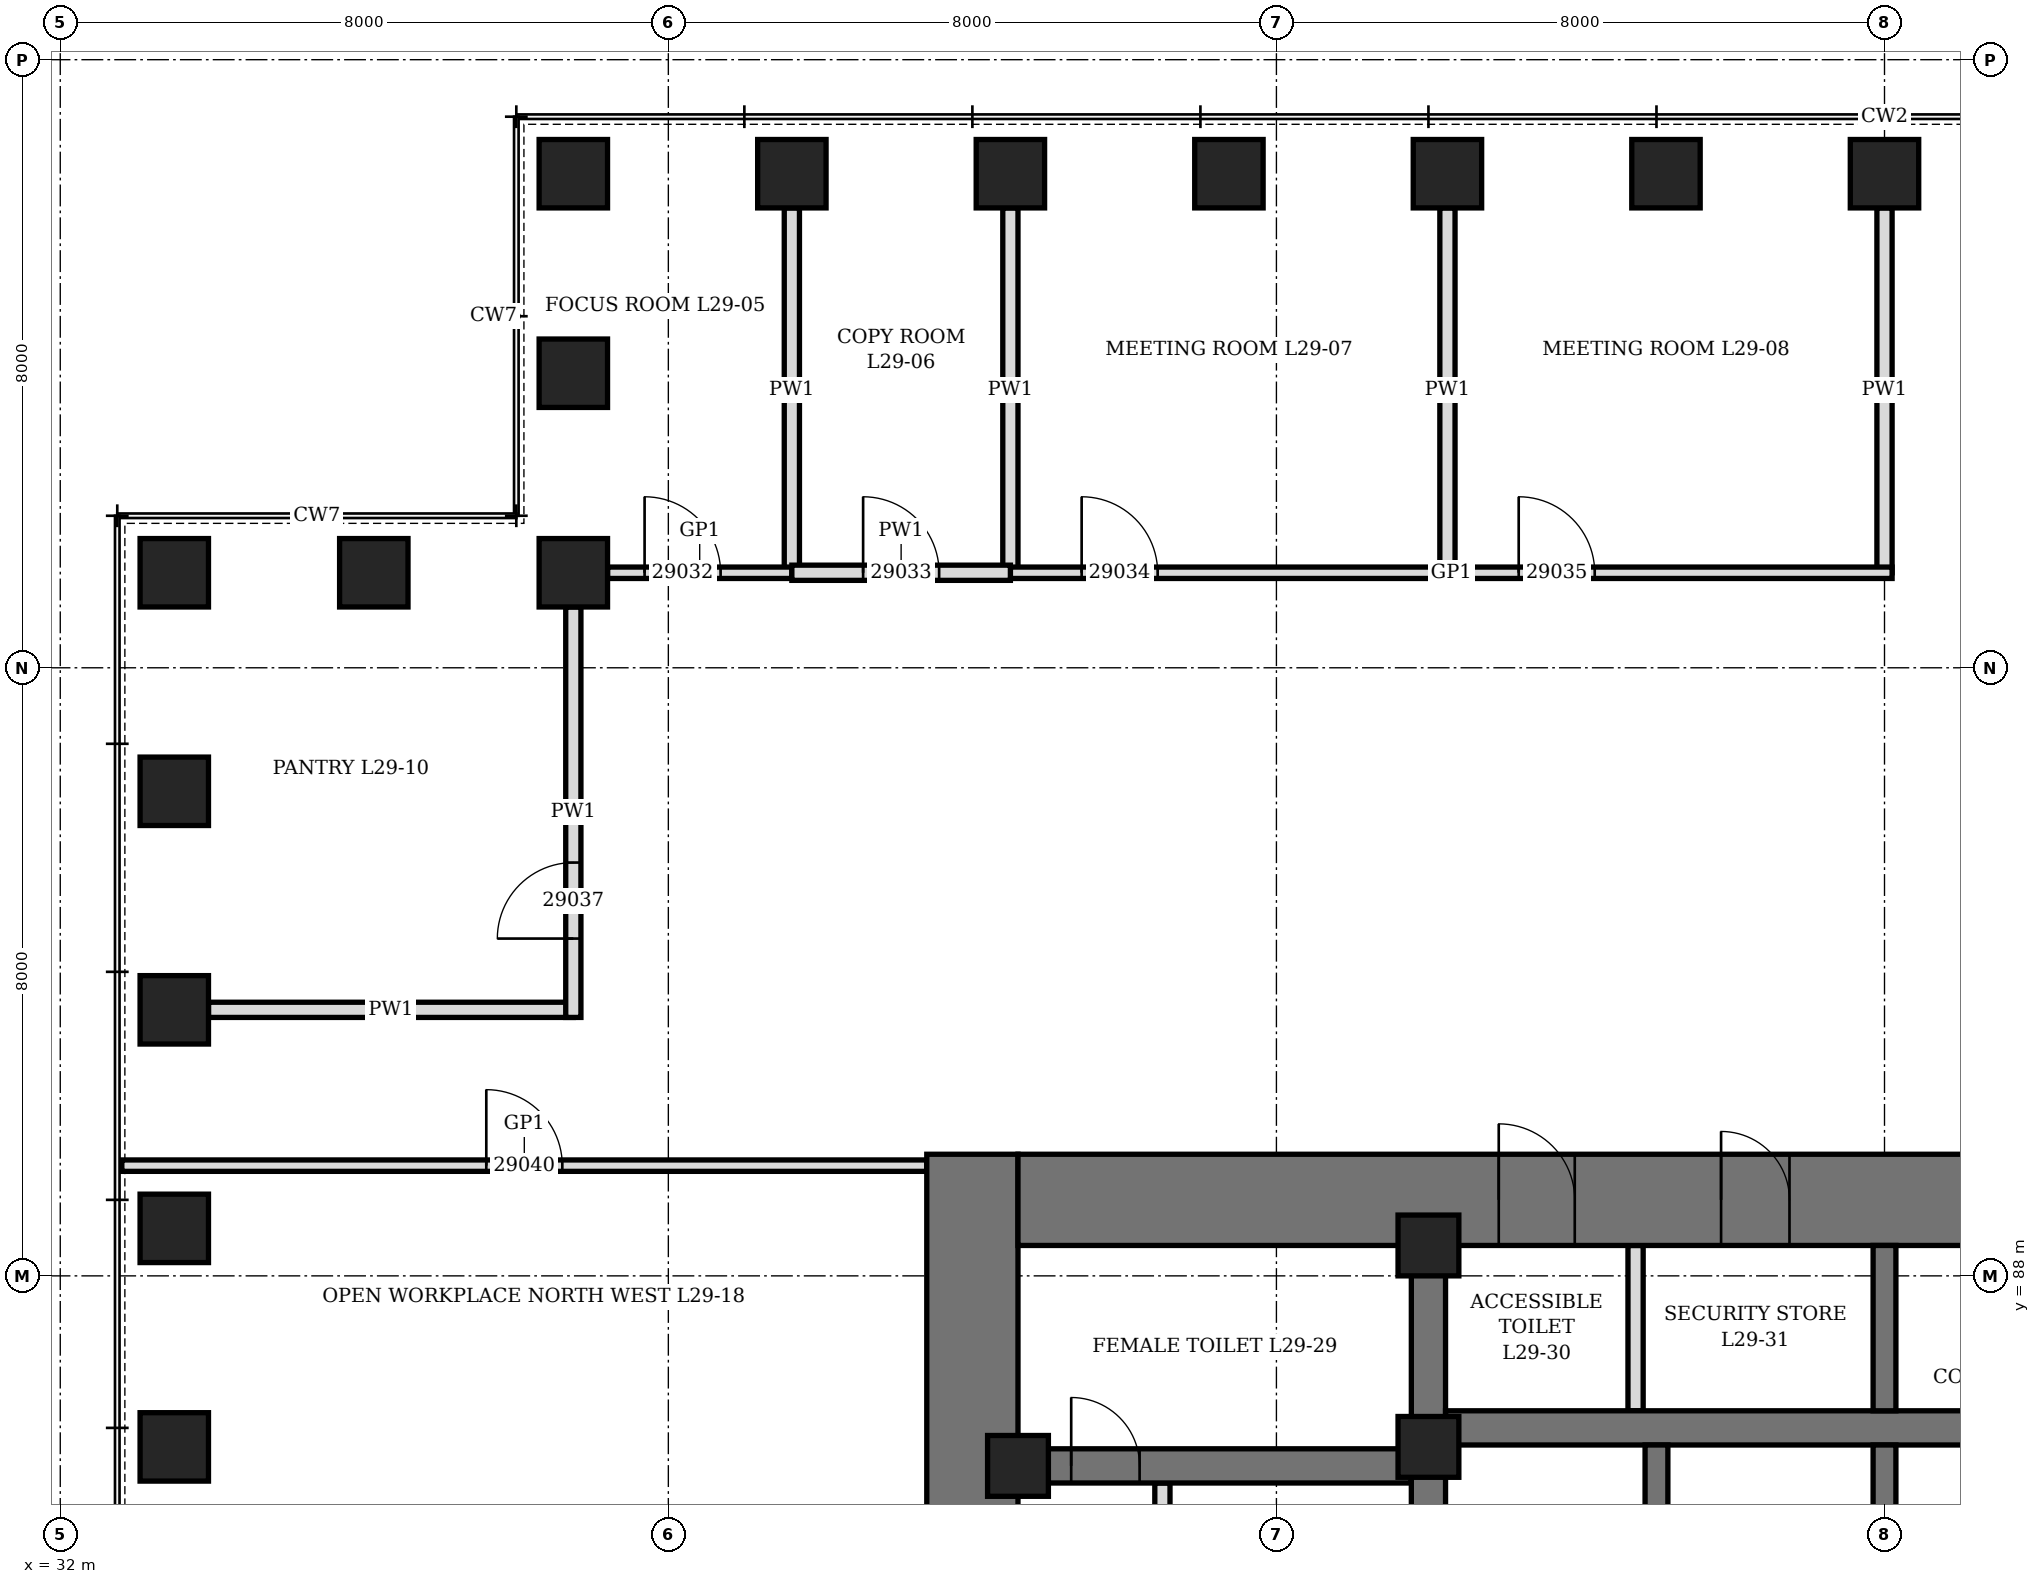
"""IFC4 building model, lengths in metres.
Left out: names, types, materials, properties, quantities, classifications, styles, units other than length and angle.
Written with IfcOpenShell. Run it as: python <this file> out.ifc"""

import sys

from ifc_helpers import new_model, si_unit, direction, frame, frame_2d, origin, origin_2d, place, context, subcontext, project, spatial, rectangle, hollow_rectangle, extrude, element, fill, save


model = new_model("IFC4")
c1 = context("Model", 3, precision=1e-05, world=origin(), true_north=direction((0.0, 1.0)))
c2 = subcontext(c1, "Body", "Model", "MODEL_VIEW")
j1 = project(units=[si_unit("LENGTHUNIT", "METRE"), si_unit("PLANEANGLEUNIT", "RADIAN")], contexts=[c1])
p1 = place(None, origin())
s1 = spatial("IfcSite", under=j1, at=p1, CompositionType="ELEMENT")
p2 = place(p1, origin())
s2 = spatial("IfcBuilding", under=s1, at=p2, CompositionType="ELEMENT")
p3 = place(p2, frame((0.0, 0.0, 133.3)))
s3 = spatial("IfcBuildingStorey", under=s2, at=p3, CompositionType="ELEMENT", Elevation=133.3)
for number, where, z_axis, x_axis in (
    (1, (56.0, 102.5, 0.0), (0.0, 0.0, 1.0), (1.0, 0.0, 0.0)),
    (2, (53.125, 102.5, 0.0), (0.0, 0.0, 1.0), (1.0, 0.0, 0.0)),
    (3, (50.25, 102.5, 0.0), (0.0, 0.0, 1.0), (1.0, 0.0, 0.0)),
    (4, (47.375, 102.5, 0.0), (0.0, 0.0, 1.0), (1.0, 0.0, 0.0)),
    (5, (44.5, 102.5, 0.0), (0.0, 0.0, 1.0), (1.0, 0.0, 0.0)),
    (6, (41.625, 102.5, 0.0), (0.0, 0.0, 1.0), (1.0, 0.0, 0.0)),
    (7, (38.75, 102.5, 0.0), (0.0, 0.0, 1.0), (0.0, 1.0, 0.0)),
    (8, (38.75, 99.875, 0.0), (0.0, 0.0, 1.0), (0.0, 1.0, 0.0)),
    (9, (38.75, 97.25, 0.0), (0.0, 0.0, 1.0), (1.0, 0.0, 0.0)),
    (10, (36.125, 97.25, 0.0), (0.0, 0.0, 1.0), (1.0, 0.0, 0.0)),
    (11, (33.5, 97.25, 0.0), (0.0, 0.0, 1.0), (0.0, 1.0, 0.0)),
    (12, (33.5, 94.375, 0.0), (0.0, 0.0, 1.0), (0.0, 1.0, 0.0)),
    (13, (33.5, 91.5, 0.0), (0.0, 0.0, 1.0), (0.0, 1.0, 0.0)),
    (14, (33.5, 88.625, 0.0), (0.0, 0.0, 1.0), (0.0, 1.0, 0.0)),
    (15, (33.5, 85.75, 0.0), (0.0, 0.0, 1.0), (0.0, 1.0, 0.0)),
):
    element("IfcColumn", number, at=place(p3, frame(where, z_axis=z_axis, x_axis=x_axis)), inside=s3, PredefinedType="COLUMN", context=c2, shape_type="SweptSolid", body=[
        extrude(hollow_rectangle(XDim=0.9, YDim=0.9, WallThickness=0.15, at=origin_2d()), origin(), (0.0, 0.0, 1.0), 4.2),
    ])
p4 = place(p3, frame((44.0, 70.4, 0.0), z_axis=(0.0, 0.0, 1.0), x_axis=(0.0, 1.0, 0.0)))
e16 = element("IfcWall", 16, at=p4, inside=s3, PredefinedType="SHEAR", context=c2, shape_type="SweptSolid", body=[
    extrude(rectangle(XDim=19.2, YDim=1.2, at=frame_2d((9.6, 0.0))), origin(), (0.0, 0.0, 1.0), 4.2),
])
p5 = place(p4, frame((8.6, 0.0, 0.0)))
e17 = element("IfcOpeningElement", 17, at=p5, cuts=e16, PredefinedType="OPENING", context=c2, shape_type="SweptSolid", body=[
    extrude(rectangle(XDim=2.0, YDim=2.4, at=frame_2d((1.0, 1.2))), frame((0.0, 0.61, 0.0), z_axis=(0.0, -1.0, 0.0), x_axis=(1.0, 0.0, 0.0)), (0.0, 0.0, 1.0), 1.22),
])
p6 = place(p3, frame((44.6, 89.0, 0.0), z_axis=(0.0, 0.0, 1.0), x_axis=(1.0, 0.0, 0.0)))
e18 = element("IfcWall", 18, at=p6, inside=s3, PredefinedType="SHEAR", context=c2, shape_type="SweptSolid", body=[
    extrude(rectangle(XDim=22.8, YDim=1.2, at=frame_2d((11.4, 0.0))), origin(), (0.0, 0.0, 1.0), 4.2),
])
p7 = place(p6, frame((6.325, 0.0, 0.0)))
e19 = element("IfcOpeningElement", 19, at=p7, cuts=e18, PredefinedType="OPENING", context=c2, shape_type="SweptSolid", body=[
    extrude(rectangle(XDim=1.0, YDim=2.1, at=frame_2d((0.5, 1.05))), frame((0.0, 0.61, 0.0), z_axis=(0.0, -1.0, 0.0), x_axis=(1.0, 0.0, 0.0)), (0.0, 0.0, 1.0), 1.22),
])
p8 = place(p6, frame((9.25, 0.0, 0.0)))
e20 = element("IfcOpeningElement", 20, at=p8, cuts=e18, PredefinedType="OPENING", context=c2, shape_type="SweptSolid", body=[
    extrude(rectangle(XDim=0.9, YDim=2.1, at=frame_2d((0.45, 1.05))), frame((0.0, 0.61, 0.0), z_axis=(0.0, -1.0, 0.0), x_axis=(1.0, 0.0, 0.0)), (0.0, 0.0, 1.0), 1.22),
])
p9 = place(p6, frame((13.012, 0.0, 0.0)))
e21 = element("IfcOpeningElement", 21, at=p9, cuts=e18, PredefinedType="OPENING", context=c2, shape_type="SweptSolid", body=[
    extrude(rectangle(XDim=0.9, YDim=2.1, at=frame_2d((0.45, 1.05))), frame((0.0, 0.61, 0.0), z_axis=(0.0, -1.0, 0.0), x_axis=(1.0, 0.0, 0.0)), (0.0, 0.0, 1.0), 1.22),
])
p10 = place(p3, frame((50.0, 71.6, 0.0), z_axis=(0.0, 0.0, 1.0), x_axis=(0.0, 1.0, 0.0)))
e22 = element("IfcWall", 22, at=p10, inside=s3, PredefinedType="SHEAR", context=c2, shape_type="SweptSolid", body=[
    extrude(rectangle(XDim=16.8, YDim=0.45, at=frame_2d((8.4, 0.0))), origin(), (0.0, 0.0, 1.0), 4.2),
])
p11 = place(p10, frame((7.5, 0.0, 0.0)))
e23 = element("IfcOpeningElement", 23, at=p11, cuts=e22, PredefinedType="OPENING", context=c2, shape_type="SweptSolid", body=[
    extrude(rectangle(XDim=1.8, YDim=2.4, at=frame_2d((0.9, 1.2))), frame((0.0, 0.235, 0.0), z_axis=(0.0, -1.0, 0.0), x_axis=(1.0, 0.0, 0.0)), (0.0, 0.0, 1.0), 0.47),
])
p12 = place(p3, frame((44.6, 85.5, 0.0), z_axis=(0.0, 0.0, 1.0), x_axis=(1.0, 0.0, 0.0)))
e24 = element("IfcWall", 24, at=p12, inside=s3, PredefinedType="SHEAR", context=c2, shape_type="SweptSolid", body=[
    extrude(rectangle(XDim=5.175, YDim=0.45, at=frame_2d((2.587, 0.0))), origin(), (0.0, 0.0, 1.0), 4.2),
])
p13 = place(p12, frame((0.7, 0.0, 0.0)))
e25 = element("IfcOpeningElement", 25, at=p13, cuts=e24, PredefinedType="OPENING", context=c2, shape_type="SweptSolid", body=[
    extrude(rectangle(XDim=0.9, YDim=2.1, at=frame_2d((0.45, 1.05))), frame((0.0, 0.235, 0.0), z_axis=(0.0, -1.0, 0.0), x_axis=(1.0, 0.0, 0.0)), (0.0, 0.0, 1.0), 0.47),
])
p14 = place(p3, frame((50.225, 86.0, 0.0), z_axis=(0.0, 0.0, 1.0), x_axis=(1.0, 0.0, 0.0)))
e26 = element("IfcWall", 26, at=p14, inside=s3, PredefinedType="SHEAR", context=c2, shape_type="SweptSolid", body=[
    extrude(rectangle(XDim=11.55, YDim=0.45, at=frame_2d((5.775, 0.0))), origin(), (0.0, 0.0, 1.0), 4.2),
])
for number, where, z_axis, x_axis in (
    (27, (53.0, 82.225, 0.0), (0.0, 0.0, 1.0), (0.0, 1.0, 0.0)),
    (28, (56.0, 82.225, 0.0), (0.0, 0.0, 1.0), (0.0, 1.0, 0.0)),
):
    element("IfcWall", number, at=place(p3, frame(where, z_axis=z_axis, x_axis=x_axis)), inside=s3, PredefinedType="SHEAR", context=c2, shape_type="SweptSolid", body=[
        extrude(rectangle(XDim=3.55, YDim=0.3, at=frame_2d((1.775, 0.0))), origin(), (0.0, 0.0, 1.0), 4.2),
    ])
p15 = place(p3, frame((56.0, 86.225, 0.0), z_axis=(0.0, 0.0, 1.0), x_axis=(0.0, 1.0, 0.0)))
e29 = element("IfcWall", 29, at=p15, inside=s3, PredefinedType="SHEAR", context=c2, shape_type="SweptSolid", body=[
    extrude(rectangle(XDim=2.175, YDim=0.3, at=frame_2d((1.087, 0.0))), origin(), (0.0, 0.0, 1.0), 4.2),
])
for number, where, z_axis, x_axis in (
    (30, (44.6, 85.5, 0.0), (0.0, 0.0, 1.0), (1.0, 0.0, 0.0)),
    (31, (50.0, 85.75, 0.0), (0.0, 0.0, 1.0), (1.0, 0.0, 0.0)),
    (32, (50.0, 88.4, 0.0), (0.0, 0.0, 1.0), (1.0, 0.0, 0.0)),
):
    element("IfcColumn", number, at=place(p3, frame(where, z_axis=z_axis, x_axis=x_axis)), inside=s3, PredefinedType="COLUMN", context=c2, shape_type="SweptSolid", body=[
        extrude(hollow_rectangle(XDim=0.8, YDim=0.8, WallThickness=0.1, at=origin_2d()), origin(), (0.0, 0.0, 1.0), 4.2),
    ])
p16 = place(p3, frame((46.5, 82.225, 0.0), z_axis=(0.0, 0.0, 1.0), x_axis=(0.0, 1.0, 0.0)))
e33 = element("IfcWall", 33, at=p16, inside=s3, PredefinedType="PARTITIONING", context=c2, shape_type="SweptSolid", body=[
    extrude(rectangle(XDim=3.05, YDim=0.2, at=frame_2d((1.525, 0.0))), origin(), (0.0, 0.0, 1.0), 4.04),
])
p17 = place(p16, frame((1.075, 0.0, 0.0)))
e34 = element("IfcOpeningElement", 34, at=p17, cuts=e33, PredefinedType="OPENING", context=c2, shape_type="SweptSolid", body=[
    extrude(rectangle(XDim=0.9, YDim=2.1, at=frame_2d((0.45, 1.05))), frame((0.0, 0.11, 0.0), z_axis=(0.0, -1.0, 0.0), x_axis=(1.0, 0.0, 0.0)), (0.0, 0.0, 1.0), 0.22),
])
p18 = place(p3, frame((52.725, 86.225, 0.0), z_axis=(0.0, 0.0, 1.0), x_axis=(0.0, 1.0, 0.0)))
e35 = element("IfcWall", 35, at=p18, inside=s3, PredefinedType="PARTITIONING", context=c2, shape_type="SweptSolid", body=[
    extrude(rectangle(XDim=2.175, YDim=0.2, at=frame_2d((1.087, 0.0))), origin(), (0.0, 0.0, 1.0), 4.04),
])
p19 = place(p3, frame((41.625, 97.25, 0.0), z_axis=(0.0, 0.0, 1.0), x_axis=(0.0, 1.0, 0.0)))
e36 = element("IfcWall", 36, at=p19, inside=s3, PredefinedType="PARTITIONING", context=c2, shape_type="SweptSolid", body=[
    extrude(rectangle(XDim=4.8, YDim=0.2, at=frame_2d((2.4, 0.0))), origin(), (0.0, 0.0, 1.0), 3.428),
])
p20 = place(p3, frame((44.5, 97.25, 0.0), z_axis=(0.0, 0.0, 1.0), x_axis=(0.0, 1.0, 0.0)))
e37 = element("IfcWall", 37, at=p20, inside=s3, PredefinedType="PARTITIONING", context=c2, shape_type="SweptSolid", body=[
    extrude(rectangle(XDim=4.8, YDim=0.2, at=frame_2d((2.4, 0.0))), origin(), (0.0, 0.0, 1.0), 2.74),
])
for number, where, z_axis, x_axis in (
    (38, (50.25, 97.25, 0.0), (0.0, 0.0, 1.0), (0.0, 1.0, 0.0)),
    (39, (56.0, 97.25, 0.0), (0.0, 0.0, 1.0), (0.0, 1.0, 0.0)),
):
    element("IfcWall", number, at=place(p3, frame(where, z_axis=z_axis, x_axis=x_axis)), inside=s3, PredefinedType="PARTITIONING", context=c2, shape_type="SweptSolid", body=[
        extrude(rectangle(XDim=4.8, YDim=0.2, at=frame_2d((2.4, 0.0))), origin(), (0.0, 0.0, 1.0), 3.278),
    ])
p21 = place(p3, frame((33.95, 91.5, 0.0), z_axis=(0.0, 0.0, 1.0), x_axis=(1.0, 0.0, 0.0)))
e40 = element("IfcWall", 40, at=p21, inside=s3, PredefinedType="PARTITIONING", context=c2, shape_type="SweptSolid", body=[
    extrude(rectangle(XDim=4.8, YDim=0.2, at=frame_2d((2.4, 0.0))), origin(), (0.0, 0.0, 1.0), 3.428),
])
p22 = place(p3, frame((32.81, 89.45, 0.0), z_axis=(0.0, 0.0, 1.0), x_axis=(1.0, 0.0, 0.0)))
e41 = element("IfcWall", 41, at=p22, inside=s3, PredefinedType="PARTITIONING", context=c2, shape_type="SweptSolid", body=[
    extrude(rectangle(XDim=10.59, YDim=0.15, at=frame_2d((5.295, 0.0))), origin(), (0.0, 0.0, 1.0), 4.04),
])
p23 = place(p22, frame((4.795, 0.0, 0.0)))
e42 = element("IfcOpeningElement", 42, at=p23, cuts=e41, PredefinedType="OPENING", context=c2, shape_type="SweptSolid", body=[
    extrude(rectangle(XDim=1.0, YDim=2.4, at=frame_2d((0.5, 1.2))), frame((0.0, 0.085, 0.0), z_axis=(0.0, -1.0, 0.0), x_axis=(1.0, 0.0, 0.0)), (0.0, 0.0, 1.0), 0.17),
])
p24 = place(p3, frame((39.2, 97.25, 0.0), z_axis=(0.0, 0.0, 1.0), x_axis=(1.0, 0.0, 0.0)))
e43 = element("IfcWall", 43, at=p24, inside=s3, PredefinedType="PARTITIONING", context=c2, shape_type="SweptSolid", body=[
    extrude(rectangle(XDim=2.425, YDim=0.15, at=frame_2d((1.212, 0.0))), origin(), (0.0, 0.0, 1.0), 4.04),
])
p25 = place(p24, frame((0.488, 0.0, 0.0)))
e44 = element("IfcOpeningElement", 44, at=p25, cuts=e43, PredefinedType="OPENING", context=c2, shape_type="SweptSolid", body=[
    extrude(rectangle(XDim=1.0, YDim=2.4, at=frame_2d((0.5, 1.2))), frame((0.0, 0.085, 0.0), z_axis=(0.0, -1.0, 0.0), x_axis=(1.0, 0.0, 0.0)), (0.0, 0.0, 1.0), 0.17),
])
p26 = place(p3, frame((44.5, 97.25, 0.0), z_axis=(0.0, 0.0, 1.0), x_axis=(1.0, 0.0, 0.0)))
e45 = element("IfcWall", 45, at=p26, inside=s3, PredefinedType="PARTITIONING", context=c2, shape_type="SweptSolid", body=[
    extrude(rectangle(XDim=11.6, YDim=0.15, at=frame_2d((5.8, 0.0))), origin(), (0.0, 0.0, 1.0), 4.04),
])
p27 = place(p26, frame((0.938, 0.0, 0.0)))
e46 = element("IfcOpeningElement", 46, at=p27, cuts=e45, PredefinedType="OPENING", context=c2, shape_type="SweptSolid", body=[
    extrude(rectangle(XDim=1.0, YDim=2.4, at=frame_2d((0.5, 1.2))), frame((0.0, 0.085, 0.0), z_axis=(0.0, -1.0, 0.0), x_axis=(1.0, 0.0, 0.0)), (0.0, 0.0, 1.0), 0.17),
])
p28 = place(p26, frame((6.688, 0.0, 0.0)))
e47 = element("IfcOpeningElement", 47, at=p28, cuts=e45, PredefinedType="OPENING", context=c2, shape_type="SweptSolid", body=[
    extrude(rectangle(XDim=1.0, YDim=2.4, at=frame_2d((0.5, 1.2))), frame((0.0, 0.085, 0.0), z_axis=(0.0, -1.0, 0.0), x_axis=(1.0, 0.0, 0.0)), (0.0, 0.0, 1.0), 0.17),
])
p29 = place(p3, frame((41.625, 97.25, 0.0), z_axis=(0.0, 0.0, 1.0), x_axis=(1.0, 0.0, 0.0)))
e48 = element("IfcWall", 48, at=p29, inside=s3, PredefinedType="PARTITIONING", context=c2, shape_type="SweptSolid", body=[
    extrude(rectangle(XDim=2.875, YDim=0.2, at=frame_2d((1.438, 0.0))), origin(), (0.0, 0.0, 1.0), 4.04),
])
p30 = place(p29, frame((0.938, 0.0, 0.0)))
e49 = element("IfcOpeningElement", 49, at=p30, cuts=e48, PredefinedType="OPENING", context=c2, shape_type="SweptSolid", body=[
    extrude(rectangle(XDim=1.0, YDim=2.1, at=frame_2d((0.5, 1.05))), frame((0.0, 0.11, 0.0), z_axis=(0.0, -1.0, 0.0), x_axis=(1.0, 0.0, 0.0)), (0.0, 0.0, 1.0), 0.22),
])
p31 = place(p3, frame((38.75, 91.4, 0.0), z_axis=(0.0, 0.0, 1.0), x_axis=(0.0, 1.0, 0.0)))
e50 = element("IfcWall", 50, at=p31, inside=s3, PredefinedType="PARTITIONING", context=c2, shape_type="SweptSolid", body=[
    extrude(rectangle(XDim=5.4, YDim=0.2, at=frame_2d((2.7, 0.0))), origin(), (0.0, 0.0, 1.0), 4.04),
])
p32 = place(p31, frame((1.038, 0.0, 0.0)))
e51 = element("IfcOpeningElement", 51, at=p32, cuts=e50, PredefinedType="OPENING", context=c2, shape_type="SweptSolid", body=[
    extrude(rectangle(XDim=1.0, YDim=2.1, at=frame_2d((0.5, 1.05))), frame((0.0, 0.11, 0.0), z_axis=(0.0, -1.0, 0.0), x_axis=(1.0, 0.0, 0.0)), (0.0, 0.0, 1.0), 0.22),
])
p33 = place(p13, origin())
e52 = element("IfcDoor", 52, at=p33, inside=s3, OperationType="SINGLE_SWING_RIGHT", PredefinedType="DOOR", context=c2, shape_type="SweptSolid", body=[
    extrude(rectangle(XDim=0.9, YDim=2.1, at=frame_2d((0.45, 1.05))), frame((0.0, 0.225, 0.0), z_axis=(0.0, -1.0, 0.0), x_axis=(1.0, 0.0, 0.0)), (0.0, 0.0, 1.0), 0.449),
])
fill(e25, e52)
p34 = place(p7, origin())
e53 = element("IfcDoor", 53, at=p34, inside=s3, OperationType="SINGLE_SWING_LEFT", PredefinedType="DOOR", context=c2, shape_type="SweptSolid", body=[
    extrude(rectangle(XDim=1.0, YDim=2.1, at=frame_2d((0.5, 1.05))), frame((0.0, 0.35, 0.0), z_axis=(0.0, -1.0, 0.0), x_axis=(1.0, 0.0, 0.0)), (0.0, 0.0, 1.0), 0.7),
])
fill(e19, e53)
p35 = place(p8, origin())
e54 = element("IfcDoor", 54, at=p35, inside=s3, OperationType="SINGLE_SWING_LEFT", PredefinedType="DOOR", context=c2, shape_type="SweptSolid", body=[
    extrude(rectangle(XDim=0.9, YDim=2.1, at=frame_2d((0.45, 1.05))), frame((0.0, 0.35, 0.0), z_axis=(0.0, -1.0, 0.0), x_axis=(1.0, 0.0, 0.0)), (0.0, 0.0, 1.0), 0.7),
])
fill(e20, e54)
p36 = place(p25, origin())
e55 = element("IfcDoor", 55, at=p36, inside=s3, OperationType="SINGLE_SWING_RIGHT", PredefinedType="DOOR", context=c2, shape_type="SweptSolid", body=[
    extrude(rectangle(XDim=1.0, YDim=2.4, at=frame_2d((0.5, 1.2))), frame((0.0, 0.075, 0.0), z_axis=(0.0, -1.0, 0.0), x_axis=(1.0, 0.0, 0.0)), (0.0, 0.0, 1.0), 0.149),
])
fill(e44, e55)
p37 = place(p30, origin())
e56 = element("IfcDoor", 56, at=p37, inside=s3, OperationType="SINGLE_SWING_LEFT", PredefinedType="DOOR", context=c2, shape_type="SweptSolid", body=[
    extrude(rectangle(XDim=1.0, YDim=2.1, at=frame_2d((0.5, 1.05))), frame((0.0, 0.1, 0.0), z_axis=(0.0, -1.0, 0.0), x_axis=(1.0, 0.0, 0.0)), (0.0, 0.0, 1.0), 0.199),
])
fill(e49, e56)
p38 = place(p27, origin())
e57 = element("IfcDoor", 57, at=p38, inside=s3, OperationType="SINGLE_SWING_RIGHT", PredefinedType="DOOR", context=c2, shape_type="SweptSolid", body=[
    extrude(rectangle(XDim=1.0, YDim=2.4, at=frame_2d((0.5, 1.2))), frame((0.0, 0.075, 0.0), z_axis=(0.0, -1.0, 0.0), x_axis=(1.0, 0.0, 0.0)), (0.0, 0.0, 1.0), 0.149),
])
fill(e46, e57)
p39 = place(p28, origin())
e58 = element("IfcDoor", 58, at=p39, inside=s3, OperationType="SINGLE_SWING_RIGHT", PredefinedType="DOOR", context=c2, shape_type="SweptSolid", body=[
    extrude(rectangle(XDim=1.0, YDim=2.4, at=frame_2d((0.5, 1.2))), frame((0.0, 0.075, 0.0), z_axis=(0.0, -1.0, 0.0), x_axis=(1.0, 0.0, 0.0)), (0.0, 0.0, 1.0), 0.149),
])
fill(e47, e58)
p40 = place(p32, origin())
e59 = element("IfcDoor", 59, at=p40, inside=s3, OperationType="SINGLE_SWING_LEFT", PredefinedType="DOOR", context=c2, shape_type="SweptSolid", body=[
    extrude(rectangle(XDim=1.0, YDim=2.1, at=frame_2d((0.5, 1.05))), frame((0.0, 0.1, 0.0), z_axis=(0.0, -1.0, 0.0), x_axis=(1.0, 0.0, 0.0)), (0.0, 0.0, 1.0), 0.199),
])
fill(e51, e59)
p41 = place(p23, origin())
e60 = element("IfcDoor", 60, at=p41, inside=s3, OperationType="SINGLE_SWING_RIGHT", PredefinedType="DOOR", context=c2, shape_type="SweptSolid", body=[
    extrude(rectangle(XDim=1.0, YDim=2.4, at=frame_2d((0.5, 1.2))), frame((0.0, 0.075, 0.0), z_axis=(0.0, -1.0, 0.0), x_axis=(1.0, 0.0, 0.0)), (0.0, 0.0, 1.0), 0.149),
])
fill(e42, e60)
save(model, sys.argv[1])
